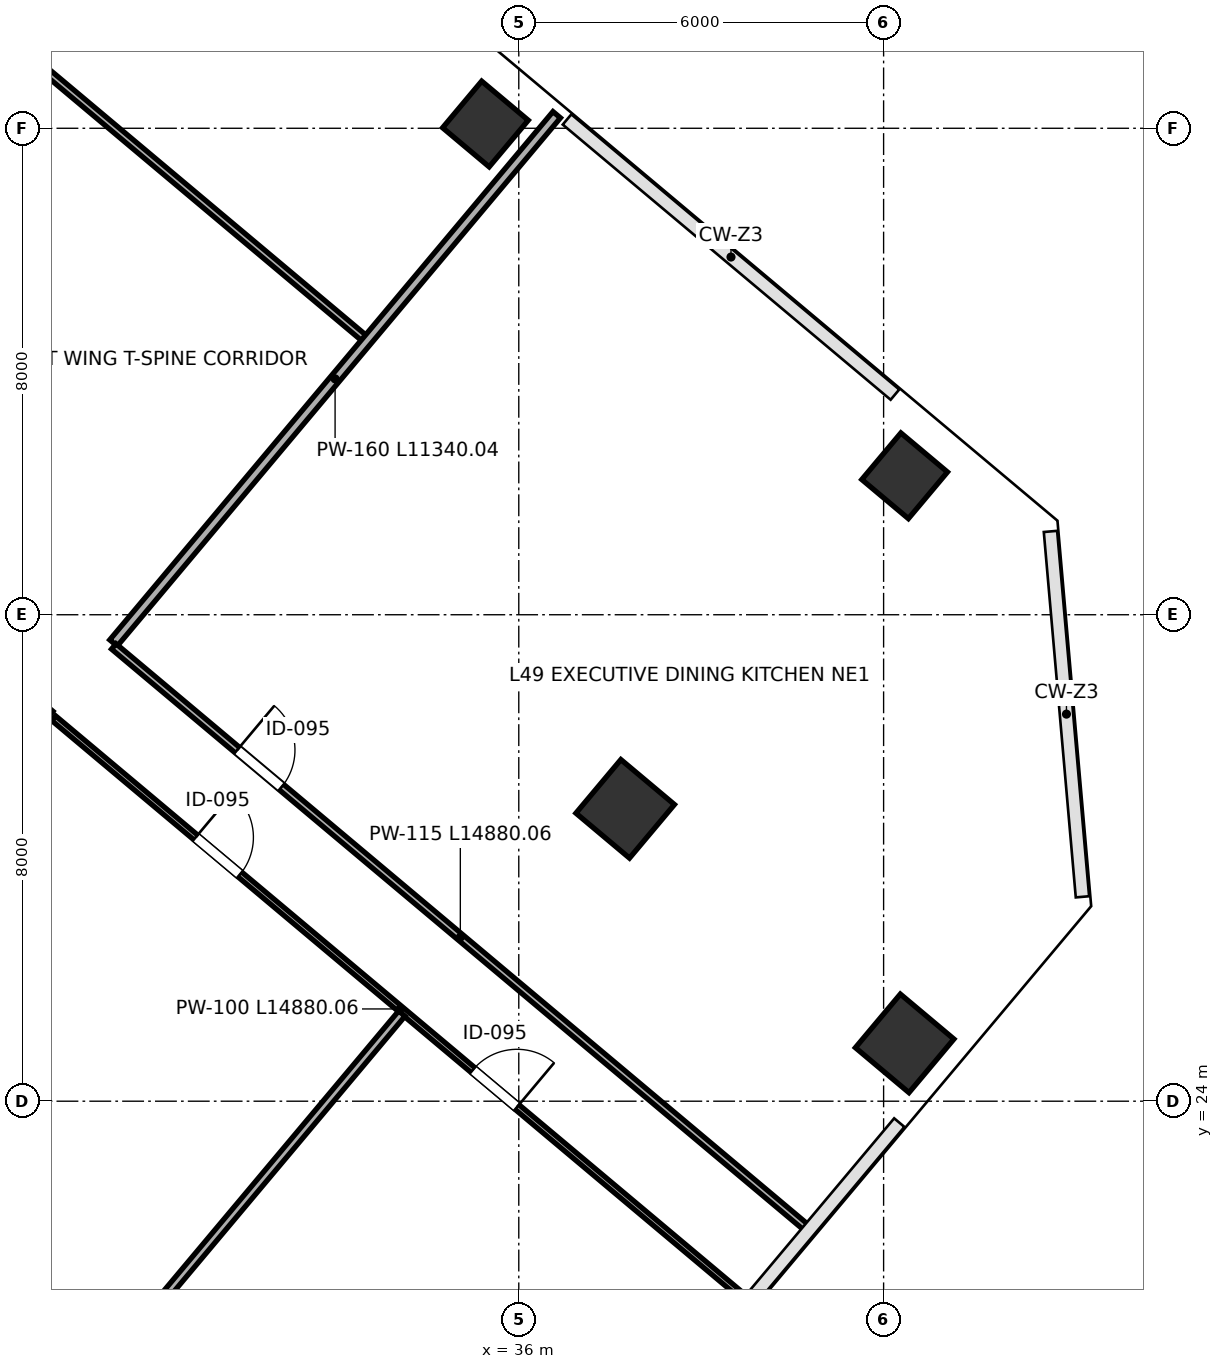
"""IFC4 building model, lengths in metres.
Left out: names, types, materials, properties, quantities, classifications, styles, units other than length and angle.
Written with IfcOpenShell. Run it as: python <this file> out.ifc"""

import sys

from ifc_helpers import new_model, si_unit, direction, frame, frame_2d, origin, origin_2d, place, context, subcontext, project, spatial, rectangle, extrude, source, transform, mapped, element, fill, save


model = new_model("IFC4")
c1 = context("Model", 3, precision=1e-05, world=origin(), true_north=direction((0.0, 1.0)))
c2 = subcontext(c1, "Body", "Model", "MODEL_VIEW")
j1 = project(units=[si_unit("LENGTHUNIT", "METRE"), si_unit("PLANEANGLEUNIT", "RADIAN")], contexts=[c1])
p1 = place(None, origin())
s1 = spatial("IfcSite", under=j1, at=p1, CompositionType="ELEMENT")
p2 = place(p1, origin())
s2 = spatial("IfcBuilding", under=s1, at=p2, CompositionType="ELEMENT")
p3 = place(p2, frame((0.0, 0.0, 220.6)))
s3 = spatial("IfcBuildingStorey", under=s2, at=p3, CompositionType="ELEMENT", Elevation=220.6)
m1 = source(origin(), c2, "Body", "SweptSolid", [
    extrude(rectangle(XDim=1.0, YDim=1.0, at=origin_2d()), origin(), (0.0, 0.0, 1.0), 4.198),
])
p4 = place(p3, frame((35.451, 40.07, 0.001), z_axis=(0.0, 0.0, 1.0), x_axis=(-0.766044443119, 0.642787609687, 0.0)))
e1 = element("IfcColumn", 1, at=p4, inside=s3, PredefinedType="COLUMN", context=c2, shape_type="MappedRepresentation", body=[
    mapped(m1, transform((0.0, 0.0, 0.0), scale=1.0)),
])
m2 = source(origin(), c2, "Body", "SweptSolid", [
    extrude(rectangle(XDim=1.15, YDim=1.15, at=origin_2d()), origin(), (0.0, 0.0, 1.0), 4.198),
])
p5 = place(p3, frame((37.75, 28.808, 0.001), z_axis=(0.0, 0.0, 1.0), x_axis=(-0.766044443119, 0.642787609687, 0.0)))
e2 = element("IfcColumn", 2, at=p5, inside=s3, PredefinedType="COLUMN", context=c2, shape_type="MappedRepresentation", body=[
    mapped(m2, transform((0.0, 0.0, 0.0), scale=1.0)),
])
p6 = place(p3, frame((42.346, 34.285, 0.001), z_axis=(0.0, 0.0, 1.0), x_axis=(-0.766044443119, 0.642787609687, 0.0)))
e3 = element("IfcColumn", 3, at=p6, inside=s3, PredefinedType="COLUMN", context=c2, shape_type="MappedRepresentation", body=[
    mapped(m1, transform((0.0, 0.0, 0.0), scale=1.0)),
])
m3 = source(origin(), c2, "Body", "SweptSolid", [
    extrude(rectangle(XDim=1.15, YDim=1.15, at=origin_2d()), origin(), (0.0, 0.0, 1.0), 4.198),
])
p7 = place(p3, frame((42.346, 24.951, 0.001), z_axis=(0.0, 0.0, 1.0), x_axis=(-0.766044443119, 0.642787609687, 0.0)))
e4 = element("IfcColumn", 4, at=p7, inside=s3, PredefinedType="COLUMN", context=c2, shape_type="MappedRepresentation", body=[
    mapped(m3, transform((0.0, 0.0, 0.0), scale=1.0)),
])
p8 = place(p3, frame((27.2, 31.264, 0.0), z_axis=(0.0, 0.0, 1.0), x_axis=(0.766046809659, -0.642784789344, 0.0)))
e5 = element("IfcWall", 5, at=p8, inside=s3, PredefinedType="PARTITIONING", context=c2, shape_type="SweptSolid", body=[
    extrude(rectangle(XDim=1.42, YDim=0.16, at=frame_2d((0.71, 0.0))), origin(), (0.0, 0.0, 1.0), 3.96),
])
p9 = place(p3, frame((16.416, 50.848, 0.0), z_axis=(0.0, 0.0, 1.0), x_axis=(0.766043174175, -0.642789121951, 0.0)))
e6 = element("IfcWall", 6, at=p9, inside=s3, PredefinedType="PARTITIONING", context=c2, shape_type="SweptSolid", body=[
    extrude(rectangle(XDim=22.27, YDim=0.115, at=frame_2d((11.135, 0.0))), origin(), (0.0, 0.0, 1.0), 3.96),
])
p10 = place(p9, frame((1.05, 0.0, 0.0)))
e7 = element("IfcOpeningElement", 7, at=p10, cuts=e6, PredefinedType="OPENING", context=c2, shape_type="SweptSolid", body=[
    extrude(rectangle(XDim=0.95, YDim=2.15, at=frame_2d((0.475, 1.075))), frame((0.0, 0.067, 0.0), z_axis=(0.0, -1.0, 0.0), x_axis=(1.0, 0.0, 0.0)), (0.0, 0.0, 1.0), 0.135),
])
p11 = place(p9, frame((9.8, 0.0, 0.0)))
e8 = element("IfcOpeningElement", 8, at=p11, cuts=e6, PredefinedType="OPENING", context=c2, shape_type="SweptSolid", body=[
    extrude(rectangle(XDim=0.95, YDim=2.15, at=frame_2d((0.475, 1.075))), frame((0.0, 0.067, 0.0), z_axis=(0.0, -1.0, 0.0), x_axis=(1.0, 0.0, 0.0)), (0.0, 0.0, 1.0), 0.135),
])
p12 = place(p3, frame((29.334, 31.535, 0.0), z_axis=(0.0, 0.0, 1.0), x_axis=(0.642789592208, 0.766042779581, 0.0)))
e9 = element("IfcWall", 9, at=p12, inside=s3, PredefinedType="PARTITIONING", context=c2, shape_type="SweptSolid", body=[
    extrude(rectangle(XDim=11.34, YDim=0.16, at=frame_2d((5.67, 0.0))), origin(), (0.0, 0.0, 1.0), 3.195),
])
p13 = place(p3, frame((29.339, 31.479, 0.0), z_axis=(0.0, 0.0, 1.0), x_axis=(0.766048981681, -0.6427822008, 0.0)))
e10 = element("IfcWall", 10, at=p13, inside=s3, PredefinedType="PARTITIONING", context=c2, shape_type="SweptSolid", body=[
    extrude(rectangle(XDim=14.88, YDim=0.115, at=frame_2d((7.44, 0.0))), origin(), (0.0, 0.0, 1.0), 3.96),
])
p14 = place(p13, frame((2.65, 0.0, 0.0)))
e11 = element("IfcOpeningElement", 11, at=p14, cuts=e10, PredefinedType="OPENING", context=c2, shape_type="SweptSolid", body=[
    extrude(rectangle(XDim=0.95, YDim=2.15, at=frame_2d((0.475, 1.075))), frame((0.0, 0.067, 0.0), z_axis=(0.0, -1.0, 0.0), x_axis=(1.0, 0.0, 0.0)), (0.0, 0.0, 1.0), 0.135),
])
p15 = place(p3, frame((28.349, 30.3, 0.0), z_axis=(0.0, 0.0, 1.0), x_axis=(0.766042202636, -0.642790279781, 0.0)))
e12 = element("IfcWall", 12, at=p15, inside=s3, PredefinedType="PARTITIONING", context=c2, shape_type="SweptSolid", body=[
    extrude(rectangle(XDim=14.88, YDim=0.1, at=frame_2d((7.44, 0.0))), origin(), (0.0, 0.0, 1.0), 3.96),
])
p16 = place(p15, frame((3.05, 0.0, 0.0)))
e13 = element("IfcOpeningElement", 13, at=p16, cuts=e12, PredefinedType="OPENING", context=c2, shape_type="SweptSolid", body=[
    extrude(rectangle(XDim=0.95, YDim=2.15, at=frame_2d((0.475, 1.075))), frame((0.0, 0.06, 0.0), z_axis=(0.0, -1.0, 0.0), x_axis=(1.0, 0.0, 0.0)), (0.0, 0.0, 1.0), 0.12),
])
p17 = place(p15, frame((9.0, 0.0, 0.0)))
e14 = element("IfcOpeningElement", 14, at=p17, cuts=e12, PredefinedType="OPENING", context=c2, shape_type="SweptSolid", body=[
    extrude(rectangle(XDim=0.95, YDim=2.15, at=frame_2d((0.475, 1.075))), frame((0.0, 0.06, 0.0), z_axis=(0.0, -1.0, 0.0), x_axis=(1.0, 0.0, 0.0)), (0.0, 0.0, 1.0), 0.12),
])
p18 = place(p3, frame((22.969, 12.204, 0.0), z_axis=(0.0, 0.0, 1.0), x_axis=(0.642787758903, 0.766044317912, 0.0)))
e15 = element("IfcWall", 15, at=p18, inside=s3, PredefinedType="PARTITIONING", context=c2, shape_type="SweptSolid", body=[
    extrude(rectangle(XDim=17.28, YDim=0.135, at=frame_2d((8.64, 0.0))), origin(), (0.0, 0.0, 1.0), 3.96),
])
m4 = source(origin(), c2, "Body", "SweptSolid", [
    extrude(rectangle(XDim=0.95, YDim=2.15, at=frame_2d((0.475, 1.075))), frame((0.0, 0.025, 0.0), z_axis=(0.0, -1.0, 0.0), x_axis=(1.0, 0.0, 0.0)), (0.0, 0.0, 1.0), 0.05),
])
p19 = place(p14, origin())
e16 = element("IfcDoor", 16, at=p19, inside=s3, OperationType="SINGLE_SWING_LEFT", PredefinedType="DOOR", context=c2, shape_type="MappedRepresentation", body=[
    mapped(m4, transform((0.0, 0.0, 0.0), scale=1.0)),
])
fill(e11, e16)
p20 = place(p16, origin())
e17 = element("IfcDoor", 17, at=p20, inside=s3, OperationType="SINGLE_SWING_LEFT", PredefinedType="DOOR", context=c2, shape_type="MappedRepresentation", body=[
    mapped(m4, transform((0.0, 0.0, 0.0), scale=1.0)),
])
fill(e13, e17)
p21 = place(p17, origin())
e18 = element("IfcDoor", 18, at=p21, inside=s3, OperationType="SINGLE_SWING_RIGHT", PredefinedType="DOOR", context=c2, shape_type="MappedRepresentation", body=[
    mapped(m4, transform((0.0, 0.0, 0.0), scale=1.0)),
])
fill(e14, e18)
save(model, sys.argv[1])
